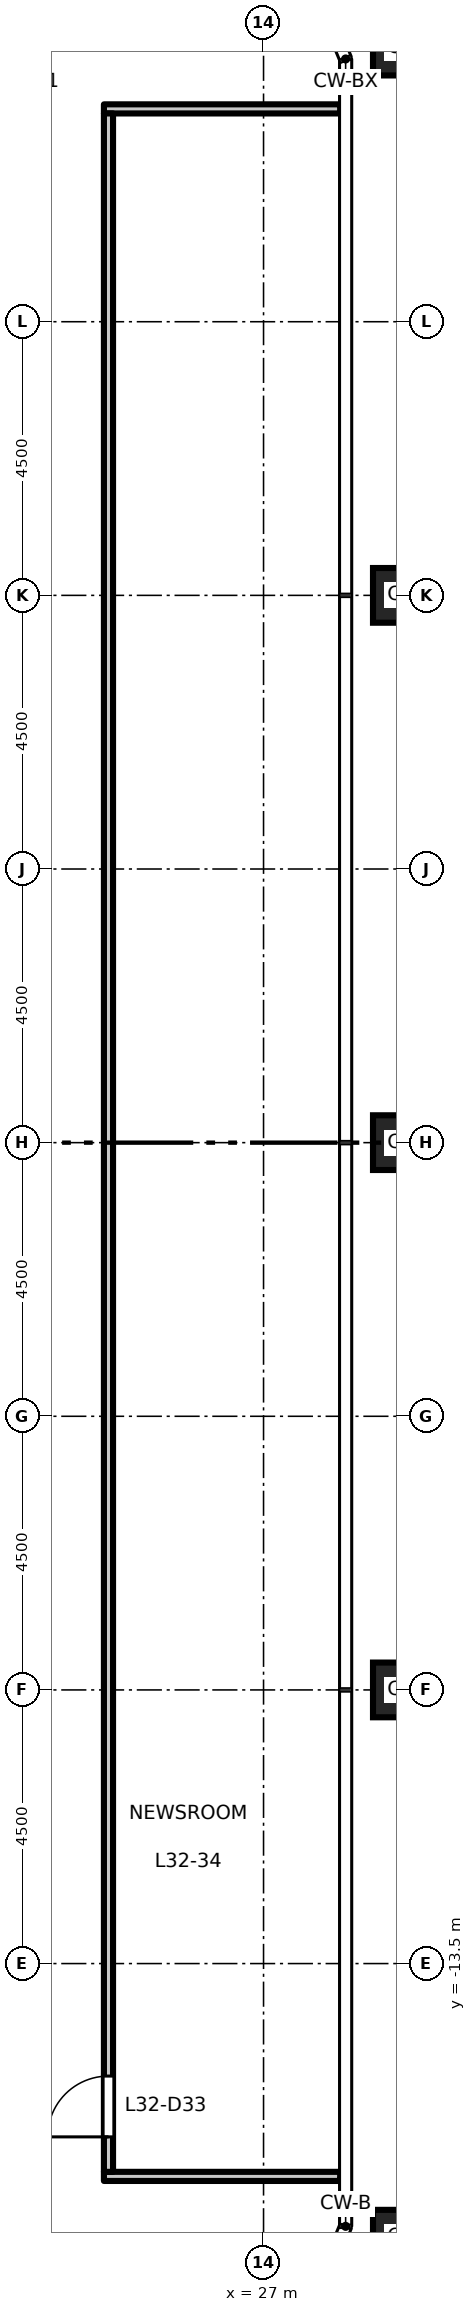
"""IFC4 building model, lengths in metres.
Left out: names, types, materials, properties, quantities, classifications, styles, units other than length and angle.
Written with IfcOpenShell. Run it as: python <this file> out.ifc"""

import sys

from ifc_helpers import new_model, si_unit, direction, frame, frame_2d, origin, origin_2d, place, context, subcontext, project, spatial, rectangle, hollow_rectangle, extrude, element, fill, save


model = new_model("IFC4")
c1 = context("Model", 3, precision=1e-05, world=origin(), true_north=direction((0.0, 1.0)))
c2 = subcontext(c1, "Body", "Model", "MODEL_VIEW")
j1 = project(units=[si_unit("LENGTHUNIT", "METRE"), si_unit("PLANEANGLEUNIT", "RADIAN")], contexts=[c1])
p1 = place(None, origin())
s1 = spatial("IfcSite", under=j1, at=p1, CompositionType="ELEMENT")
p2 = place(p1, origin())
s2 = spatial("IfcBuilding", under=s1, at=p2, CompositionType="ELEMENT")
p3 = place(p2, frame((0.0, 0.0, 149.7)))
s3 = spatial("IfcBuildingStorey", under=s2, at=p3, CompositionType="ELEMENT", Elevation=149.7)
for number, where, z_axis, x_axis in (
    (1, (29.25, -18.0, 0.0), (0.0, 0.0, 1.0), (1.0, 0.0, 0.0)),
    (2, (29.25, -9.0, 0.0), (0.0, 0.0, 1.0), (1.0, 0.0, 0.0)),
    (3, (29.25, 0.0, 0.0), (0.0, 0.0, 1.0), (1.0, 0.0, 0.0)),
    (4, (29.25, 9.0, 0.0), (0.0, 0.0, 1.0), (1.0, 0.0, 0.0)),
    (5, (29.25, 18.0, 0.0), (0.0, 0.0, 1.0), (1.0, 0.0, 0.0)),
):
    element("IfcColumn", number, at=place(p3, frame(where, z_axis=z_axis, x_axis=x_axis)), inside=s3, PredefinedType="COLUMN", context=c2, shape_type="SweptSolid", body=[
        extrude(hollow_rectangle(XDim=0.9, YDim=0.9, WallThickness=0.05, at=origin_2d()), origin(), (0.0, 0.0, 1.0), 4.5),
    ])
for number, where, z_axis, x_axis in (
    (6, (24.375, -17.0, 0.0), (0.0, 0.0, 1.0), (1.0, 0.0, 0.0)),
    (7, (24.375, 17.0, 0.0), (0.0, 0.0, 1.0), (1.0, 0.0, 0.0)),
):
    element("IfcWall", number, at=place(p3, frame(where, z_axis=z_axis, x_axis=x_axis)), inside=s3, PredefinedType="PARTITIONING", context=c2, shape_type="SweptSolid", body=[
        extrude(rectangle(XDim=3.885, YDim=0.15, at=frame_2d((1.942, 0.0))), origin(), (0.0, 0.0, 1.0), 4.35),
    ])
p4 = place(p3, frame((24.45, -16.925, 0.0), z_axis=(0.0, 0.0, 1.0), x_axis=(0.0, 1.0, 0.0)))
e8 = element("IfcWall", 8, at=p4, inside=s3, PredefinedType="PARTITIONING", context=c2, shape_type="SweptSolid", body=[
    extrude(rectangle(XDim=33.85, YDim=0.15, at=frame_2d((16.925, 0.0))), origin(), (0.0, 0.0, 1.0), 4.35),
])
p5 = place(p4, frame((0.575, 0.0, 0.0)))
e9 = element("IfcOpeningElement", 9, at=p5, cuts=e8, PredefinedType="OPENING", context=c2, shape_type="SweptSolid", body=[
    extrude(rectangle(XDim=1.0, YDim=2.1, at=frame_2d((0.5, 1.05))), frame((0.0, 0.085, 0.0), z_axis=(0.0, -1.0, 0.0), x_axis=(1.0, 0.0, 0.0)), (0.0, 0.0, 1.0), 0.17),
])
p6 = place(p5, origin())
e10 = element("IfcDoor", 10, at=p6, inside=s3, OperationType="SINGLE_SWING_LEFT", PredefinedType="DOOR", context=c2, shape_type="SweptSolid", body=[
    extrude(rectangle(XDim=1.0, YDim=2.1, at=frame_2d((0.5, 1.05))), frame((0.0, 0.025, 0.0), z_axis=(0.0, -1.0, 0.0), x_axis=(1.0, 0.0, 0.0)), (0.0, 0.0, 1.0), 0.05),
])
fill(e9, e10)
save(model, sys.argv[1])
